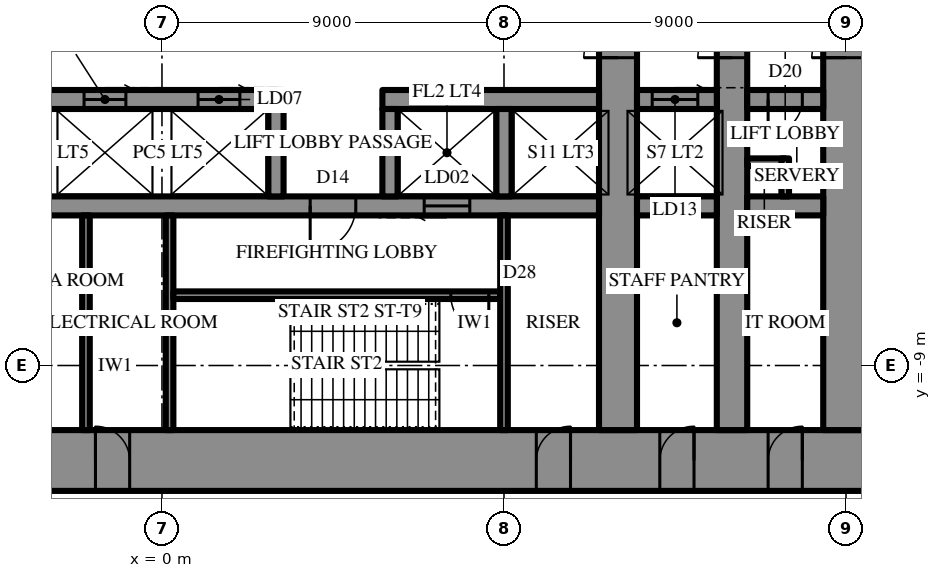
"""IFC4 building model, lengths in metres.
Left out: names, types, materials, properties, quantities, classifications, styles, units other than length and angle.
Written with IfcOpenShell. Run it as: python <this file> out.ifc"""

import sys

from ifc_helpers import new_model, si_unit, direction, frame, frame_2d, origin, place, context, subcontext, project, spatial, rectangle, extrude, element, fill, save


model = new_model("IFC4")
c1 = context("Model", 3, precision=1e-05, world=origin(), true_north=direction((0.0, 1.0)))
c2 = subcontext(c1, "Body", "Model", "MODEL_VIEW")
j1 = project(units=[si_unit("LENGTHUNIT", "METRE"), si_unit("PLANEANGLEUNIT", "RADIAN")], contexts=[c1])
p1 = place(None, origin())
s1 = spatial("IfcSite", under=j1, at=p1, CompositionType="ELEMENT")
p2 = place(p1, origin())
s2 = spatial("IfcBuilding", under=s1, at=p2, CompositionType="ELEMENT")
p3 = place(p2, frame((0.0, 0.0, 210.5)))
s3 = spatial("IfcBuildingStorey", under=s2, at=p3, CompositionType="ELEMENT", Elevation=210.5)
p4 = place(p3, frame((18.6, -11.5, 0.0), z_axis=(0.0, 0.0, 1.0), x_axis=(-1.0, 0.0, 0.0)))
e1 = element("IfcWall", 1, at=p4, inside=s3, PredefinedType="SHEAR", context=c2, shape_type="SweptSolid", body=[
    extrude(rectangle(XDim=37.2, YDim=1.6, at=frame_2d((18.6, 0.0))), origin(), (0.0, 0.0, 1.0), 5.0),
])
p5 = place(p4, frame((19.45, 0.0, 0.0)))
e2 = element("IfcOpeningElement", 2, at=p5, cuts=e1, PredefinedType="OPENING", context=c2, shape_type="SweptSolid", body=[
    extrude(rectangle(XDim=0.9, YDim=2.2, at=frame_2d((0.45, 1.1))), frame((0.0, 0.81, 0.0), z_axis=(0.0, -1.0, 0.0), x_axis=(1.0, 0.0, 0.0)), (0.0, 0.0, 1.0), 1.62),
])
p6 = place(p4, frame((22.45, 0.0, 0.0)))
e3 = element("IfcOpeningElement", 3, at=p6, cuts=e1, PredefinedType="OPENING", context=c2, shape_type="SweptSolid", body=[
    extrude(rectangle(XDim=0.9, YDim=2.2, at=frame_2d((0.45, 1.1))), frame((0.0, 0.81, 0.0), z_axis=(0.0, -1.0, 0.0), x_axis=(1.0, 0.0, 0.0)), (0.0, 0.0, 1.0), 1.62),
])
p7 = place(p4, frame((25.5, 0.0, 0.0)))
e4 = element("IfcOpeningElement", 4, at=p7, cuts=e1, PredefinedType="OPENING", context=c2, shape_type="SweptSolid", body=[
    extrude(rectangle(XDim=1.0, YDim=2.2, at=frame_2d((0.5, 1.1))), frame((0.0, 0.81, 0.0), z_axis=(0.0, -1.0, 0.0), x_axis=(1.0, 0.0, 0.0)), (0.0, 0.0, 1.0), 1.62),
])
p8 = place(p4, frame((1.75, 0.0, 0.0)))
e5 = element("IfcOpeningElement", 5, at=p8, cuts=e1, PredefinedType="OPENING", context=c2, shape_type="SweptSolid", body=[
    extrude(rectangle(XDim=0.9, YDim=2.2, at=frame_2d((0.45, 1.1))), frame((0.0, 0.81, 0.0), z_axis=(0.0, -1.0, 0.0), x_axis=(1.0, 0.0, 0.0)), (0.0, 0.0, 1.0), 1.62),
])
p9 = place(p4, frame((4.6, 0.0, 0.0)))
e6 = element("IfcOpeningElement", 6, at=p9, cuts=e1, PredefinedType="OPENING", context=c2, shape_type="SweptSolid", body=[
    extrude(rectangle(XDim=0.9, YDim=2.2, at=frame_2d((0.45, 1.1))), frame((0.0, 0.81, 0.0), z_axis=(0.0, -1.0, 0.0), x_axis=(1.0, 0.0, 0.0)), (0.0, 0.0, 1.0), 1.62),
])
p10 = place(p4, frame((7.85, 0.0, 0.0)))
e7 = element("IfcOpeningElement", 7, at=p10, cuts=e1, PredefinedType="OPENING", context=c2, shape_type="SweptSolid", body=[
    extrude(rectangle(XDim=0.9, YDim=2.2, at=frame_2d((0.45, 1.1))), frame((0.0, 0.81, 0.0), z_axis=(0.0, -1.0, 0.0), x_axis=(1.0, 0.0, 0.0)), (0.0, 0.0, 1.0), 1.62),
])
p11 = place(p4, frame((28.45, 0.0, 0.0)))
e8 = element("IfcOpeningElement", 8, at=p11, cuts=e1, PredefinedType="OPENING", context=c2, shape_type="SweptSolid", body=[
    extrude(rectangle(XDim=0.9, YDim=2.2, at=frame_2d((0.45, 1.1))), frame((0.0, 0.81, 0.0), z_axis=(0.0, -1.0, 0.0), x_axis=(1.0, 0.0, 0.0)), (0.0, 0.0, 1.0), 1.62),
])
p12 = place(p4, frame((31.7, 0.0, 0.0)))
e9 = element("IfcOpeningElement", 9, at=p12, cuts=e1, PredefinedType="OPENING", context=c2, shape_type="SweptSolid", body=[
    extrude(rectangle(XDim=0.9, YDim=2.2, at=frame_2d((0.45, 1.1))), frame((0.0, 0.81, 0.0), z_axis=(0.0, -1.0, 0.0), x_axis=(1.0, 0.0, 0.0)), (0.0, 0.0, 1.0), 1.62),
])
p13 = place(p4, frame((34.55, 0.0, 0.0)))
e10 = element("IfcOpeningElement", 10, at=p13, cuts=e1, PredefinedType="OPENING", context=c2, shape_type="SweptSolid", body=[
    extrude(rectangle(XDim=0.9, YDim=2.2, at=frame_2d((0.45, 1.1))), frame((0.0, 0.81, 0.0), z_axis=(0.0, -1.0, 0.0), x_axis=(1.0, 0.0, 0.0)), (0.0, 0.0, 1.0), 1.62),
])
p14 = place(p3, frame((18.0, -10.7, 0.0), z_axis=(0.0, 0.0, 1.0), x_axis=(0.0, 1.0, 0.0)))
e11 = element("IfcWall", 11, at=p14, inside=s3, PredefinedType="SHEAR", context=c2, shape_type="SweptSolid", body=[
    extrude(rectangle(XDim=21.4, YDim=1.2, at=frame_2d((10.7, 0.0))), origin(), (0.0, 0.0, 1.0), 5.0),
])
p15 = place(p14, frame((9.8, 0.0, 0.0)))
e12 = element("IfcOpeningElement", 12, at=p15, cuts=e11, PredefinedType="OPENING", context=c2, shape_type="SweptSolid", body=[
    extrude(rectangle(XDim=1.8, YDim=2.4, at=frame_2d((0.9, 1.2))), frame((0.0, 0.61, 0.0), z_axis=(0.0, -1.0, 0.0), x_axis=(1.0, 0.0, 0.0)), (0.0, 0.0, 1.0), 1.22),
])
p16 = place(p3, frame((12.0, -10.7, 0.0), z_axis=(0.0, 0.0, 1.0), x_axis=(0.0, 1.0, 0.0)))
e13 = element("IfcWall", 13, at=p16, inside=s3, PredefinedType="SHEAR", context=c2, shape_type="SweptSolid", body=[
    extrude(rectangle(XDim=21.4, YDim=1.0, at=frame_2d((10.7, 0.0))), origin(), (0.0, 0.0, 1.0), 5.0),
])
p17 = place(p16, frame((9.8, 0.0, 0.0)))
e14 = element("IfcOpeningElement", 14, at=p17, cuts=e13, PredefinedType="OPENING", context=c2, shape_type="SweptSolid", body=[
    extrude(rectangle(XDim=1.8, YDim=2.4, at=frame_2d((0.9, 1.2))), frame((0.0, 0.51, 0.0), z_axis=(0.0, -1.0, 0.0), x_axis=(1.0, 0.0, 0.0)), (0.0, 0.0, 1.0), 1.02),
])
p18 = place(p3, frame((15.0, -10.7, 0.0), z_axis=(0.0, 0.0, 1.0), x_axis=(0.0, 1.0, 0.0)))
e15 = element("IfcWall", 15, at=p18, inside=s3, PredefinedType="SHEAR", context=c2, shape_type="SweptSolid", body=[
    extrude(rectangle(XDim=21.4, YDim=0.8, at=frame_2d((10.7, 0.0))), origin(), (0.0, 0.0, 1.0), 5.0),
])
p19 = place(p18, frame((9.8, 0.0, 0.0)))
e16 = element("IfcOpeningElement", 16, at=p19, cuts=e15, PredefinedType="OPENING", context=c2, shape_type="SweptSolid", body=[
    extrude(rectangle(XDim=1.8, YDim=2.4, at=frame_2d((0.9, 1.2))), frame((0.0, 0.41, 0.0), z_axis=(0.0, -1.0, 0.0), x_axis=(1.0, 0.0, 0.0)), (0.0, 0.0, 1.0), 0.82),
])
p20 = place(p3, frame((17.4, -2.0, 0.0), z_axis=(0.0, 0.0, 1.0), x_axis=(-1.0, 0.0, 0.0)))
e17 = element("IfcWall", 17, at=p20, inside=s3, PredefinedType="SHEAR", context=c2, shape_type="SweptSolid", body=[
    extrude(rectangle(XDim=2.0, YDim=0.5, at=frame_2d((1.0, 0.0))), origin(), (0.0, 0.0, 1.0), 5.0),
])
p21 = place(p20, frame((0.55, 0.0, 0.0)))
e18 = element("IfcOpeningElement", 18, at=p21, cuts=e17, PredefinedType="OPENING", context=c2, shape_type="SweptSolid", body=[
    extrude(rectangle(XDim=0.9, YDim=2.2, at=frame_2d((0.45, 1.1))), frame((0.0, 0.26, 0.0), z_axis=(0.0, -1.0, 0.0), x_axis=(1.0, 0.0, 0.0)), (0.0, 0.0, 1.0), 0.52),
])
p22 = place(p3, frame((14.6, -2.0, 0.0), z_axis=(0.0, 0.0, 1.0), x_axis=(-1.0, 0.0, 0.0)))
e19 = element("IfcWall", 19, at=p22, inside=s3, PredefinedType="SHEAR", context=c2, shape_type="SweptSolid", body=[
    extrude(rectangle(XDim=2.1, YDim=0.5, at=frame_2d((1.05, 0.0))), origin(), (0.0, 0.0, 1.0), 5.0),
])
p23 = place(p22, frame((0.5, 0.0, 0.0)))
e20 = element("IfcOpeningElement", 20, at=p23, cuts=e19, PredefinedType="OPENING", context=c2, shape_type="SweptSolid", body=[
    extrude(rectangle(XDim=1.2, YDim=2.2, at=frame_2d((0.6, 1.1))), frame((0.0, 0.26, 0.0), z_axis=(0.0, -1.0, 0.0), x_axis=(1.0, 0.0, 0.0)), (0.0, 0.0, 1.0), 0.52),
])
p24 = place(p3, frame((11.5, -2.0, 0.0), z_axis=(0.0, 0.0, 1.0), x_axis=(-1.0, 0.0, 0.0)))
e21 = element("IfcWall", 21, at=p24, inside=s3, PredefinedType="SHEAR", context=c2, shape_type="SweptSolid", body=[
    extrude(rectangle(XDim=5.7, YDim=0.5, at=frame_2d((2.85, 0.0))), origin(), (0.0, 0.0, 1.0), 5.0),
])
p25 = place(p3, frame((3.2, -2.0, 0.0), z_axis=(0.0, 0.0, 1.0), x_axis=(-1.0, 0.0, 0.0)))
e22 = element("IfcWall", 22, at=p25, inside=s3, PredefinedType="SHEAR", context=c2, shape_type="SweptSolid", body=[
    extrude(rectangle(XDim=14.7, YDim=0.5, at=frame_2d((7.35, 0.0))), origin(), (0.0, 0.0, 1.0), 5.0),
])
p26 = place(p25, frame((1.15, 0.0, 0.0)))
e23 = element("IfcOpeningElement", 23, at=p26, cuts=e22, PredefinedType="OPENING", context=c2, shape_type="SweptSolid", body=[
    extrude(rectangle(XDim=1.1, YDim=2.2, at=frame_2d((0.55, 1.1))), frame((0.0, 0.26, 0.0), z_axis=(0.0, -1.0, 0.0), x_axis=(1.0, 0.0, 0.0)), (0.0, 0.0, 1.0), 0.52),
])
p27 = place(p25, frame((4.15, 0.0, 0.0)))
e24 = element("IfcOpeningElement", 24, at=p27, cuts=e22, PredefinedType="OPENING", context=c2, shape_type="SweptSolid", body=[
    extrude(rectangle(XDim=1.1, YDim=2.2, at=frame_2d((0.55, 1.1))), frame((0.0, 0.26, 0.0), z_axis=(0.0, -1.0, 0.0), x_axis=(1.0, 0.0, 0.0)), (0.0, 0.0, 1.0), 0.52),
])
p28 = place(p25, frame((7.15, 0.0, 0.0)))
e25 = element("IfcOpeningElement", 25, at=p28, cuts=e22, PredefinedType="OPENING", context=c2, shape_type="SweptSolid", body=[
    extrude(rectangle(XDim=1.1, YDim=2.2, at=frame_2d((0.55, 1.1))), frame((0.0, 0.26, 0.0), z_axis=(0.0, -1.0, 0.0), x_axis=(1.0, 0.0, 0.0)), (0.0, 0.0, 1.0), 0.52),
])
p29 = place(p25, frame((10.15, 0.0, 0.0)))
e26 = element("IfcOpeningElement", 26, at=p29, cuts=e22, PredefinedType="OPENING", context=c2, shape_type="SweptSolid", body=[
    extrude(rectangle(XDim=1.1, YDim=2.2, at=frame_2d((0.55, 1.1))), frame((0.0, 0.26, 0.0), z_axis=(0.0, -1.0, 0.0), x_axis=(1.0, 0.0, 0.0)), (0.0, 0.0, 1.0), 0.52),
])
p30 = place(p3, frame((17.4, -4.8, 0.0), z_axis=(0.0, 0.0, 1.0), x_axis=(-1.0, 0.0, 0.0)))
e27 = element("IfcWall", 27, at=p30, inside=s3, PredefinedType="SHEAR", context=c2, shape_type="SweptSolid", body=[
    extrude(rectangle(XDim=2.0, YDim=0.5, at=frame_2d((1.0, 0.0))), origin(), (0.0, 0.0, 1.0), 5.0),
])
p31 = place(p3, frame((14.6, -4.8, 0.0), z_axis=(0.0, 0.0, 1.0), x_axis=(-1.0, 0.0, 0.0)))
e28 = element("IfcWall", 28, at=p31, inside=s3, PredefinedType="SHEAR", context=c2, shape_type="SweptSolid", body=[
    extrude(rectangle(XDim=2.1, YDim=0.5, at=frame_2d((1.05, 0.0))), origin(), (0.0, 0.0, 1.0), 5.0),
])
p32 = place(p3, frame((11.5, -4.8, 0.0), z_axis=(0.0, 0.0, 1.0), x_axis=(-1.0, 0.0, 0.0)))
e29 = element("IfcWall", 29, at=p32, inside=s3, PredefinedType="SHEAR", context=c2, shape_type="SweptSolid", body=[
    extrude(rectangle(XDim=23.0, YDim=0.5, at=frame_2d((11.5, 0.0))), origin(), (0.0, 0.0, 1.0), 5.0),
])
p33 = place(p32, frame((6.4, 0.0, 0.0)))
e30 = element("IfcOpeningElement", 30, at=p33, cuts=e29, PredefinedType="OPENING", context=c2, shape_type="SweptSolid", body=[
    extrude(rectangle(XDim=1.2, YDim=2.2, at=frame_2d((0.6, 1.1))), frame((0.0, 0.26, 0.0), z_axis=(0.0, -1.0, 0.0), x_axis=(1.0, 0.0, 0.0)), (0.0, 0.0, 1.0), 0.52),
])
p34 = place(p32, frame((3.4, 0.0, 0.0)))
e31 = element("IfcOpeningElement", 31, at=p34, cuts=e29, PredefinedType="OPENING", context=c2, shape_type="SweptSolid", body=[
    extrude(rectangle(XDim=1.2, YDim=2.2, at=frame_2d((0.6, 1.1))), frame((0.0, 0.26, 0.0), z_axis=(0.0, -1.0, 0.0), x_axis=(1.0, 0.0, 0.0)), (0.0, 0.0, 1.0), 0.52),
])
for number, where, z_axis, x_axis in (
    (32, (9.0, -2.25, 0.0), (0.0, 0.0, 1.0), (0.0, -1.0, 0.0)),
    (33, (6.0, -2.25, 0.0), (0.0, 0.0, 1.0), (0.0, -1.0, 0.0)),
    (34, (3.0, -2.25, 0.0), (0.0, 0.0, 1.0), (0.0, -1.0, 0.0)),
):
    element("IfcWall", number, at=place(p3, frame(where, z_axis=z_axis, x_axis=x_axis)), inside=s3, PredefinedType="SHEAR", context=c2, shape_type="SweptSolid", body=[
        extrude(rectangle(XDim=2.3, YDim=0.4, at=frame_2d((1.15, 0.0))), origin(), (0.0, 0.0, 1.0), 5.0),
    ])
p35 = place(p3, frame((0.2, -5.05, 0.0), z_axis=(0.0, 0.0, 1.0), x_axis=(0.0, -1.0, 0.0)))
e35 = element("IfcWall", 35, at=p35, inside=s3, PredefinedType="SHEAR", context=c2, shape_type="SweptSolid", body=[
    extrude(rectangle(XDim=5.65, YDim=0.2, at=frame_2d((2.825, 0.0))), origin(), (0.0, 0.0, 1.0), 5.0),
])
p36 = place(p3, frame((8.9, -7.15, 0.0), z_axis=(0.0, 0.0, 1.0), x_axis=(-1.0, 0.0, 0.0)))
e36 = element("IfcWall", 36, at=p36, inside=s3, PredefinedType="SHEAR", context=c2, shape_type="SweptSolid", body=[
    extrude(rectangle(XDim=8.6, YDim=0.2, at=frame_2d((4.3, 0.0))), origin(), (0.0, 0.0, 1.0), 5.0),
])
p37 = place(p36, frame((0.3, 0.0, 0.0)))
e37 = element("IfcOpeningElement", 37, at=p37, cuts=e36, PredefinedType="OPENING", context=c2, shape_type="SweptSolid", body=[
    extrude(rectangle(XDim=1.0, YDim=2.2, at=frame_2d((0.5, 1.1))), frame((0.0, 0.11, 0.0), z_axis=(0.0, -1.0, 0.0), x_axis=(1.0, 0.0, 0.0)), (0.0, 0.0, 1.0), 0.22),
])
p38 = place(p3, frame((18.057, -26.425, 0.0), z_axis=(0.0, 0.0, 1.0), x_axis=(0.500001051461, 0.866024796723, 0.0)))
e38 = element("IfcWall", 38, at=p38, inside=s3, PredefinedType="SOLIDWALL", context=c2, shape_type="SweptSolid", body=[
    extrude(rectangle(XDim=27.713, YDim=0.3, at=frame_2d((13.856, 0.0))), origin(), (0.0, 0.0, 1.0), 2.8),
])
p39 = place(p38, frame((1.309, 0.0, 0.6)))
e39 = element("IfcOpeningElement", 39, at=p39, cuts=e38, PredefinedType="OPENING", context=c2, shape_type="SweptSolid", body=[
    extrude(rectangle(XDim=2.0, YDim=1.95, at=frame_2d((1.0, 0.975))), frame((0.0, 0.16, 0.0), z_axis=(0.0, -1.0, 0.0), x_axis=(1.0, 0.0, 0.0)), (0.0, 0.0, 1.0), 0.32),
])
p40 = place(p38, frame((5.928, 0.0, 0.6)))
e40 = element("IfcOpeningElement", 40, at=p40, cuts=e38, PredefinedType="OPENING", context=c2, shape_type="SweptSolid", body=[
    extrude(rectangle(XDim=2.0, YDim=1.95, at=frame_2d((1.0, 0.975))), frame((0.0, 0.16, 0.0), z_axis=(0.0, -1.0, 0.0), x_axis=(1.0, 0.0, 0.0)), (0.0, 0.0, 1.0), 0.32),
])
p41 = place(p38, frame((10.947, 0.0, 0.0)))
e41 = element("IfcOpeningElement", 41, at=p41, cuts=e38, PredefinedType="OPENING", context=c2, shape_type="SweptSolid", body=[
    extrude(rectangle(XDim=1.2, YDim=2.4, at=frame_2d((0.6, 1.2))), frame((0.0, 0.16, 0.0), z_axis=(0.0, -1.0, 0.0), x_axis=(1.0, 0.0, 0.0)), (0.0, 0.0, 1.0), 0.32),
])
p42 = place(p38, frame((15.166, 0.0, 0.6)))
e42 = element("IfcOpeningElement", 42, at=p42, cuts=e38, PredefinedType="OPENING", context=c2, shape_type="SweptSolid", body=[
    extrude(rectangle(XDim=2.0, YDim=1.95, at=frame_2d((1.0, 0.975))), frame((0.0, 0.16, 0.0), z_axis=(0.0, -1.0, 0.0), x_axis=(1.0, 0.0, 0.0)), (0.0, 0.0, 1.0), 0.32),
])
p43 = place(p38, frame((19.785, 0.0, 0.6)))
e43 = element("IfcOpeningElement", 43, at=p43, cuts=e38, PredefinedType="OPENING", context=c2, shape_type="SweptSolid", body=[
    extrude(rectangle(XDim=2.0, YDim=1.95, at=frame_2d((1.0, 0.975))), frame((0.0, 0.16, 0.0), z_axis=(0.0, -1.0, 0.0), x_axis=(1.0, 0.0, 0.0)), (0.0, 0.0, 1.0), 0.32),
])
p44 = place(p38, frame((24.403, 0.0, 0.6)))
e44 = element("IfcOpeningElement", 44, at=p44, cuts=e38, PredefinedType="OPENING", context=c2, shape_type="SweptSolid", body=[
    extrude(rectangle(XDim=2.0, YDim=1.95, at=frame_2d((1.0, 0.975))), frame((0.0, 0.16, 0.0), z_axis=(0.0, -1.0, 0.0), x_axis=(1.0, 0.0, 0.0)), (0.0, 0.0, 1.0), 0.32),
])
for number, where, z_axis, x_axis in (
    (45, (9.0, -5.05, 0.0), (0.0, 0.0, 1.0), (0.0, -1.0, 0.0)),
    (46, (-2.0, -5.05, 0.0), (0.0, 0.0, 1.0), (0.0, -1.0, 0.0)),
):
    element("IfcWall", number, at=place(p3, frame(where, z_axis=z_axis, x_axis=x_axis)), inside=s3, PredefinedType="PARTITIONING", context=c2, shape_type="SweptSolid", body=[
        extrude(rectangle(XDim=5.65, YDim=0.2, at=frame_2d((2.825, 0.0))), origin(), (0.0, 0.0, 1.0), 4.8),
    ])
for number, where, z_axis, x_axis in (
    (47, (16.4, -3.65, 0.0), (0.0, 0.0, 1.0), (-1.0, 0.0, 0.0)),
    (48, (16.4, -3.55, 0.0), (0.0, 0.0, 1.0), (0.0, -1.0, 0.0)),
):
    element("IfcWall", number, at=place(p3, frame(where, z_axis=z_axis, x_axis=x_axis)), inside=s3, PredefinedType="PARTITIONING", context=c2, shape_type="SweptSolid", body=[
        extrude(rectangle(XDim=1.0, YDim=0.2, at=frame_2d((0.5, 0.0))), origin(), (0.0, 0.0, 1.0), 4.8),
    ])
p45 = place(p15, origin())
e49 = element("IfcDoor", 49, at=p45, inside=s3, OperationType="DOUBLE_DOOR_SINGLE_SWING", PredefinedType="DOOR", context=c2, shape_type="SweptSolid", body=[
    extrude(rectangle(XDim=1.8, YDim=2.4, at=frame_2d((0.9, 1.2))), frame((0.0, 0.025, 0.0), z_axis=(0.0, -1.0, 0.0), x_axis=(1.0, 0.0, 0.0)), (0.0, 0.0, 1.0), 0.05),
])
fill(e12, e49)
p46 = place(p33, origin())
e50 = element("IfcDoor", 50, at=p46, inside=s3, OperationType="SINGLE_SWING_LEFT", PredefinedType="DOOR", context=c2, shape_type="SweptSolid", body=[
    extrude(rectangle(XDim=1.2, YDim=2.2, at=frame_2d((0.6, 1.1))), frame((0.0, 0.025, 0.0), z_axis=(0.0, -1.0, 0.0), x_axis=(1.0, 0.0, 0.0)), (0.0, 0.0, 1.0), 0.05),
])
fill(e30, e50)
p47 = place(p37, origin())
e51 = element("IfcDoor", 51, at=p47, inside=s3, OperationType="SINGLE_SWING_RIGHT", PredefinedType="DOOR", context=c2, shape_type="SweptSolid", body=[
    extrude(rectangle(XDim=1.0, YDim=2.2, at=frame_2d((0.5, 1.1))), frame((0.0, 0.025, 0.0), z_axis=(0.0, -1.0, 0.0), x_axis=(1.0, 0.0, 0.0)), (0.0, 0.0, 1.0), 0.05),
])
fill(e37, e51)
p48 = place(p5, frame((0.9, 0.0, 0.0), z_axis=(0.0, 0.0, 1.0), x_axis=(-1.0, 0.0, 0.0)))
e52 = element("IfcDoor", 52, at=p48, inside=s3, OperationType="SINGLE_SWING_RIGHT", PredefinedType="DOOR", context=c2, shape_type="SweptSolid", body=[
    extrude(rectangle(XDim=0.9, YDim=2.2, at=frame_2d((0.45, 1.1))), frame((0.0, 0.025, 0.0), z_axis=(0.0, -1.0, 0.0), x_axis=(1.0, 0.0, 0.0)), (0.0, 0.0, 1.0), 0.05),
])
fill(e2, e52)
p49 = place(p8, frame((0.9, 0.0, 0.0), z_axis=(0.0, 0.0, 1.0), x_axis=(-1.0, 0.0, 0.0)))
e53 = element("IfcDoor", 53, at=p49, inside=s3, OperationType="SINGLE_SWING_LEFT", PredefinedType="DOOR", context=c2, shape_type="SweptSolid", body=[
    extrude(rectangle(XDim=0.9, YDim=2.2, at=frame_2d((0.45, 1.1))), frame((0.0, 0.025, 0.0), z_axis=(0.0, -1.0, 0.0), x_axis=(1.0, 0.0, 0.0)), (0.0, 0.0, 1.0), 0.05),
])
fill(e5, e53)
p50 = place(p9, frame((0.9, 0.0, 0.0), z_axis=(0.0, 0.0, 1.0), x_axis=(-1.0, 0.0, 0.0)))
e54 = element("IfcDoor", 54, at=p50, inside=s3, OperationType="SINGLE_SWING_LEFT", PredefinedType="DOOR", context=c2, shape_type="SweptSolid", body=[
    extrude(rectangle(XDim=0.9, YDim=2.2, at=frame_2d((0.45, 1.1))), frame((0.0, 0.025, 0.0), z_axis=(0.0, -1.0, 0.0), x_axis=(1.0, 0.0, 0.0)), (0.0, 0.0, 1.0), 0.05),
])
fill(e6, e54)
p51 = place(p10, frame((0.9, 0.0, 0.0), z_axis=(0.0, 0.0, 1.0), x_axis=(-1.0, 0.0, 0.0)))
e55 = element("IfcDoor", 55, at=p51, inside=s3, OperationType="SINGLE_SWING_LEFT", PredefinedType="DOOR", context=c2, shape_type="SweptSolid", body=[
    extrude(rectangle(XDim=0.9, YDim=2.2, at=frame_2d((0.45, 1.1))), frame((0.0, 0.025, 0.0), z_axis=(0.0, -1.0, 0.0), x_axis=(1.0, 0.0, 0.0)), (0.0, 0.0, 1.0), 0.05),
])
fill(e7, e55)
p52 = place(p21, origin())
e56 = element("IfcDoor", 56, at=p52, inside=s3, OperationType="SINGLE_SWING_LEFT", PredefinedType="DOOR", context=c2, shape_type="SweptSolid", body=[
    extrude(rectangle(XDim=0.9, YDim=2.2, at=frame_2d((0.45, 1.1))), frame((0.0, 0.025, 0.0), z_axis=(0.0, -1.0, 0.0), x_axis=(1.0, 0.0, 0.0)), (0.0, 0.0, 1.0), 0.05),
])
fill(e18, e56)
p53 = place(p17, origin())
e57 = element("IfcDoor", 57, at=p53, inside=s3, OperationType="DOUBLE_DOOR_SINGLE_SWING", PredefinedType="DOOR", context=c2, shape_type="SweptSolid", body=[
    extrude(rectangle(XDim=1.8, YDim=2.4, at=frame_2d((0.9, 1.2))), frame((0.0, 0.025, 0.0), z_axis=(0.0, -1.0, 0.0), x_axis=(1.0, 0.0, 0.0)), (0.0, 0.0, 1.0), 0.05),
])
fill(e14, e57)
p54 = place(p19, origin())
e58 = element("IfcDoor", 58, at=p54, inside=s3, OperationType="DOUBLE_DOOR_SINGLE_SWING", PredefinedType="DOOR", context=c2, shape_type="SweptSolid", body=[
    extrude(rectangle(XDim=1.8, YDim=2.4, at=frame_2d((0.9, 1.2))), frame((0.0, 0.025, 0.0), z_axis=(0.0, -1.0, 0.0), x_axis=(1.0, 0.0, 0.0)), (0.0, 0.0, 1.0), 0.05),
])
fill(e16, e58)
p55 = place(p23, frame((1.2, 0.0, 0.0), z_axis=(0.0, 0.0, 1.0), x_axis=(-1.0, 0.0, 0.0)))
e59 = element("IfcDoor", 59, at=p55, inside=s3, OperationType="SLIDING_TO_LEFT", PredefinedType="DOOR", context=c2, shape_type="SweptSolid", body=[
    extrude(rectangle(XDim=1.2, YDim=2.2, at=frame_2d((0.6, 1.1))), frame((0.0, 0.025, 0.0), z_axis=(0.0, -1.0, 0.0), x_axis=(1.0, 0.0, 0.0)), (0.0, 0.0, 1.0), 0.05),
])
fill(e20, e59)
p56 = place(p34, origin())
e60 = element("IfcDoor", 60, at=p56, inside=s3, OperationType="SLIDING_TO_LEFT", PredefinedType="DOOR", context=c2, shape_type="SweptSolid", body=[
    extrude(rectangle(XDim=1.2, YDim=2.2, at=frame_2d((0.6, 1.1))), frame((0.0, 0.025, 0.0), z_axis=(0.0, -1.0, 0.0), x_axis=(1.0, 0.0, 0.0)), (0.0, 0.0, 1.0), 0.05),
])
fill(e31, e60)
p57 = place(p26, frame((1.1, 0.0, 0.0), z_axis=(0.0, 0.0, 1.0), x_axis=(-1.0, 0.0, 0.0)))
e61 = element("IfcDoor", 61, at=p57, inside=s3, OperationType="SLIDING_TO_LEFT", PredefinedType="DOOR", context=c2, shape_type="SweptSolid", body=[
    extrude(rectangle(XDim=1.1, YDim=2.2, at=frame_2d((0.55, 1.1))), frame((0.0, 0.025, 0.0), z_axis=(0.0, -1.0, 0.0), x_axis=(1.0, 0.0, 0.0)), (0.0, 0.0, 1.0), 0.05),
])
fill(e23, e61)
p58 = place(p27, frame((1.1, 0.0, 0.0), z_axis=(0.0, 0.0, 1.0), x_axis=(-1.0, 0.0, 0.0)))
e62 = element("IfcDoor", 62, at=p58, inside=s3, OperationType="SLIDING_TO_LEFT", PredefinedType="DOOR", context=c2, shape_type="SweptSolid", body=[
    extrude(rectangle(XDim=1.1, YDim=2.2, at=frame_2d((0.55, 1.1))), frame((0.0, 0.025, 0.0), z_axis=(0.0, -1.0, 0.0), x_axis=(1.0, 0.0, 0.0)), (0.0, 0.0, 1.0), 0.05),
])
fill(e24, e62)
save(model, sys.argv[1])
